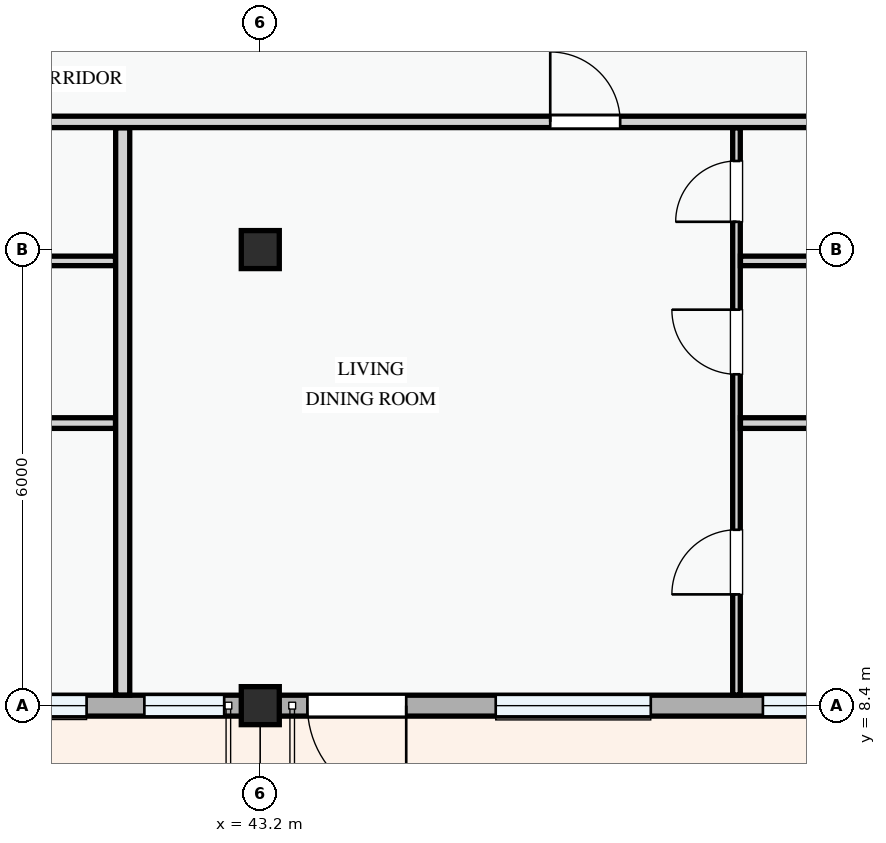
"""IFC4 building model, lengths in metres.
Left out: names, types, materials, properties, quantities, classifications, styles, units other than length and angle.
Written with IfcOpenShell. Run it as: python <this file> out.ifc"""

import sys

from ifc_helpers import new_model, si_unit, direction, frame, frame_2d, origin, origin_2d, place, context, subcontext, project, spatial, rectangle, extrude, element, fill, save


model = new_model("IFC4")
c1 = context("Model", 3, precision=1e-05, world=origin(), true_north=direction((0.0, 1.0)))
c2 = subcontext(c1, "Body", "Model", "MODEL_VIEW")
j1 = project(units=[si_unit("LENGTHUNIT", "METRE"), si_unit("PLANEANGLEUNIT", "RADIAN")], contexts=[c1])
p1 = place(None, origin())
s1 = spatial("IfcSite", under=j1, at=p1, CompositionType="ELEMENT")
p2 = place(p1, origin())
s2 = spatial("IfcBuilding", under=s1, at=p2, CompositionType="ELEMENT")
p3 = place(p2, frame((0.0, 0.0, 24.6)))
s3 = spatial("IfcBuildingStorey", under=s2, at=p3, CompositionType="ELEMENT", Elevation=24.6)
for number, where, z_axis, x_axis in (
    (1, (43.2, 8.4, 0.0), (0.0, 0.0, 1.0), (1.0, 0.0, 0.0)),
    (2, (43.2, 14.4, 0.0), (0.0, 0.0, 1.0), (1.0, 0.0, 0.0)),
):
    element("IfcColumn", number, at=place(p3, frame(where, z_axis=z_axis, x_axis=x_axis)), inside=s3, PredefinedType="COLUMN", context=c2, shape_type="SweptSolid", body=[
        extrude(rectangle(XDim=0.5, YDim=0.5, at=origin_2d()), origin(), (0.0, 0.0, 1.0), 3.3),
    ])
p4 = place(p3, frame((37.2, 8.4, 0.0), z_axis=(0.0, 0.0, 1.0), x_axis=(1.0, 0.0, 0.0)))
e3 = element("IfcWall", 3, at=p4, inside=s3, PredefinedType="STANDARD", context=c2, shape_type="SweptSolid", body=[
    extrude(rectangle(XDim=6.0, YDim=0.275, at=frame_2d((3.0, 0.0))), origin(), (0.0, 0.0, 1.0), 2.475),
])
p5 = place(p4, frame((0.62, 0.0, 0.0)))
e4 = element("IfcOpeningElement", 4, at=p5, cuts=e3, PredefinedType="OPENING", context=c2, shape_type="SweptSolid", body=[
    extrude(rectangle(XDim=1.25, YDim=2.2, at=frame_2d((0.625, 1.1))), frame((0.0, 0.147, 0.0), z_axis=(0.0, -1.0, 0.0), x_axis=(1.0, 0.0, 0.0)), (0.0, 0.0, 1.0), 0.295),
])
p6 = place(p4, frame((2.395, 0.0, 0.78)))
e5 = element("IfcOpeningElement", 5, at=p6, cuts=e3, PredefinedType="OPENING", context=c2, shape_type="SweptSolid", body=[
    extrude(rectangle(XDim=1.32, YDim=1.35, at=frame_2d((0.66, 0.675))), frame((0.0, 0.147, 0.0), z_axis=(0.0, -1.0, 0.0), x_axis=(1.0, 0.0, 0.0)), (0.0, 0.0, 1.0), 0.295),
])
p7 = place(p4, frame((4.475, 0.0, 0.78)))
e6 = element("IfcOpeningElement", 6, at=p7, cuts=e3, PredefinedType="OPENING", context=c2, shape_type="SweptSolid", body=[
    extrude(rectangle(XDim=1.05, YDim=1.2, at=frame_2d((0.525, 0.6))), frame((0.0, 0.147, 0.0), z_axis=(0.0, -1.0, 0.0), x_axis=(1.0, 0.0, 0.0)), (0.0, 0.0, 1.0), 0.295),
])
p8 = place(p3, frame((43.2, 8.4, 0.0), z_axis=(0.0, 0.0, 1.0), x_axis=(1.0, 0.0, 0.0)))
e7 = element("IfcWall", 7, at=p8, inside=s3, PredefinedType="STANDARD", context=c2, shape_type="SweptSolid", body=[
    extrude(rectangle(XDim=8.4, YDim=0.275, at=frame_2d((4.2, 0.0))), origin(), (0.0, 0.0, 1.0), 2.375),
])
p9 = place(p8, frame((0.62, 0.0, 0.0)))
e8 = element("IfcOpeningElement", 8, at=p9, cuts=e7, PredefinedType="OPENING", context=c2, shape_type="SweptSolid", body=[
    extrude(rectangle(XDim=1.3, YDim=2.15, at=frame_2d((0.65, 1.075))), frame((0.0, 0.147, 0.0), z_axis=(0.0, -1.0, 0.0), x_axis=(1.0, 0.0, 0.0)), (0.0, 0.0, 1.0), 0.295),
])
p10 = place(p8, frame((3.097, 0.0, 0.78)))
e9 = element("IfcOpeningElement", 9, at=p10, cuts=e7, PredefinedType="OPENING", context=c2, shape_type="SweptSolid", body=[
    extrude(rectangle(XDim=2.04, YDim=1.46, at=frame_2d((1.02, 0.73))), frame((0.0, 0.147, 0.0), z_axis=(0.0, -1.0, 0.0), x_axis=(1.0, 0.0, 0.0)), (0.0, 0.0, 1.0), 0.295),
])
p11 = place(p8, frame((6.613, 0.0, 0.78)))
e10 = element("IfcOpeningElement", 10, at=p11, cuts=e7, PredefinedType="OPENING", context=c2, shape_type="SweptSolid", body=[
    extrude(rectangle(XDim=1.25, YDim=1.3, at=frame_2d((0.625, 0.65))), frame((0.0, 0.147, 0.0), z_axis=(0.0, -1.0, 0.0), x_axis=(1.0, 0.0, 0.0)), (0.0, 0.0, 1.0), 0.295),
])
p12 = place(p3, frame((35.462, 12.118, 0.0), z_axis=(0.0, 0.0, 1.0), x_axis=(1.0, 0.0, 0.0)))
e11 = element("IfcWall", 11, at=p12, inside=s3, PredefinedType="PARTITIONING", context=c2, shape_type="SweptSolid", body=[
    extrude(rectangle(XDim=5.833, YDim=0.14, at=frame_2d((2.917, 0.0))), origin(), (0.0, 0.0, 1.0), 3.0),
])
p13 = place(p3, frame((35.462, 14.251, 0.0), z_axis=(0.0, 0.0, 1.0), x_axis=(1.0, 0.0, 0.0)))
e12 = element("IfcWall", 12, at=p13, inside=s3, PredefinedType="PARTITIONING", context=c2, shape_type="SweptSolid", body=[
    extrude(rectangle(XDim=5.833, YDim=0.125, at=frame_2d((2.917, 0.0))), origin(), (0.0, 0.0, 1.0), 2.375),
])
p14 = place(p3, frame((49.465, 8.54, 0.0), z_axis=(0.0, 0.0, 1.0), x_axis=(0.0, 1.0, 0.0)))
e13 = element("IfcWall", 13, at=p14, inside=s3, PredefinedType="PARTITIONING", context=c2, shape_type="SweptSolid", body=[
    extrude(rectangle(XDim=7.463, YDim=0.1, at=frame_2d((3.732, 0.0))), origin(), (0.0, 0.0, 1.0), 3.0),
])
p15 = place(p14, frame((1.324, 0.0, 0.0)))
e14 = element("IfcOpeningElement", 14, at=p15, cuts=e13, PredefinedType="OPENING", context=c2, shape_type="SweptSolid", body=[
    extrude(rectangle(XDim=0.85, YDim=2.1, at=frame_2d((0.425, 1.05))), frame((0.0, 0.06, 0.0), z_axis=(0.0, -1.0, 0.0), x_axis=(1.0, 0.0, 0.0)), (0.0, 0.0, 1.0), 0.12),
])
p16 = place(p14, frame((4.22, 0.0, 0.0)))
e15 = element("IfcOpeningElement", 15, at=p16, cuts=e13, PredefinedType="OPENING", context=c2, shape_type="SweptSolid", body=[
    extrude(rectangle(XDim=0.85, YDim=2.1, at=frame_2d((0.425, 1.05))), frame((0.0, 0.06, 0.0), z_axis=(0.0, -1.0, 0.0), x_axis=(1.0, 0.0, 0.0)), (0.0, 0.0, 1.0), 0.12),
])
p17 = place(p14, frame((6.226, 0.0, 0.0)))
e16 = element("IfcOpeningElement", 16, at=p17, cuts=e13, PredefinedType="OPENING", context=c2, shape_type="SweptSolid", body=[
    extrude(rectangle(XDim=0.8, YDim=2.1, at=frame_2d((0.4, 1.05))), frame((0.0, 0.06, 0.0), z_axis=(0.0, -1.0, 0.0), x_axis=(1.0, 0.0, 0.0)), (0.0, 0.0, 1.0), 0.12),
])
p18 = place(p3, frame((49.517, 12.118, 0.0), z_axis=(0.0, 0.0, 1.0), x_axis=(1.0, 0.0, 0.0)))
e17 = element("IfcWall", 17, at=p18, inside=s3, PredefinedType="PARTITIONING", context=c2, shape_type="SweptSolid", body=[
    extrude(rectangle(XDim=7.943, YDim=0.14, at=frame_2d((3.972, 0.0))), origin(), (0.0, 0.0, 1.0), 3.0),
])
p19 = place(p3, frame((49.517, 14.251, 0.0), z_axis=(0.0, 0.0, 1.0), x_axis=(1.0, 0.0, 0.0)))
e18 = element("IfcWall", 18, at=p19, inside=s3, PredefinedType="PARTITIONING", context=c2, shape_type="SweptSolid", body=[
    extrude(rectangle(XDim=7.943, YDim=0.125, at=frame_2d((3.972, 0.0))), origin(), (0.0, 0.0, 1.0), 2.375),
])
p20 = place(p3, frame((41.39, 8.54, 0.0), z_axis=(0.0, 0.0, 1.0), x_axis=(0.0, 1.0, 0.0)))
e19 = element("IfcWall", 19, at=p20, inside=s3, PredefinedType="PARTITIONING", context=c2, shape_type="SweptSolid", body=[
    extrude(rectangle(XDim=7.463, YDim=0.185, at=frame_2d((3.732, 0.0))), origin(), (0.0, 0.0, 1.0), 3.0),
])
p21 = place(p3, frame((22.66, 16.08, 0.0), z_axis=(0.0, 0.0, 1.0), x_axis=(1.0, 0.0, 0.0)))
e20 = element("IfcWall", 20, at=p21, inside=s3, PredefinedType="PARTITIONING", context=c2, shape_type="SweptSolid", body=[
    extrude(rectangle(XDim=34.88, YDim=0.15, at=frame_2d((17.44, 0.0))), origin(), (0.0, 0.0, 1.0), 3.0),
])
p22 = place(p21, frame((2.627, 0.0, 0.0)))
e21 = element("IfcOpeningElement", 21, at=p22, cuts=e20, PredefinedType="OPENING", context=c2, shape_type="SweptSolid", body=[
    extrude(rectangle(XDim=0.92, YDim=2.1, at=frame_2d((0.46, 1.05))), frame((0.0, 0.085, 0.0), z_axis=(0.0, -1.0, 0.0), x_axis=(1.0, 0.0, 0.0)), (0.0, 0.0, 1.0), 0.17),
])
p23 = place(p21, frame((10.02, 0.0, 0.0)))
e22 = element("IfcOpeningElement", 22, at=p23, cuts=e20, PredefinedType="OPENING", context=c2, shape_type="SweptSolid", body=[
    extrude(rectangle(XDim=0.96, YDim=2.12, at=frame_2d((0.48, 1.06))), frame((0.0, 0.085, 0.0), z_axis=(0.0, -1.0, 0.0), x_axis=(1.0, 0.0, 0.0)), (0.0, 0.0, 1.0), 0.17),
])
p24 = place(p21, frame((24.355, 0.0, 0.0)))
e23 = element("IfcOpeningElement", 23, at=p24, cuts=e20, PredefinedType="OPENING", context=c2, shape_type="SweptSolid", body=[
    extrude(rectangle(XDim=0.92, YDim=2.1, at=frame_2d((0.46, 1.05))), frame((0.0, 0.085, 0.0), z_axis=(0.0, -1.0, 0.0), x_axis=(1.0, 0.0, 0.0)), (0.0, 0.0, 1.0), 0.17),
])
p25 = place(p6, origin())
e24 = element("IfcWindow", 24, at=p25, inside=s3, PartitioningType="SINGLE_PANEL", PredefinedType="WINDOW", context=c2, shape_type="SweptSolid", body=[
    extrude(rectangle(XDim=1.32, YDim=1.35, at=frame_2d((0.66, 0.675))), frame((0.0, 0.03, 0.0), z_axis=(0.0, -1.0, 0.0), x_axis=(1.0, 0.0, 0.0)), (0.0, 0.0, 1.0), 0.06),
])
fill(e5, e24)
p26 = place(p7, origin())
e25 = element("IfcWindow", 25, at=p26, inside=s3, PartitioningType="SINGLE_PANEL", PredefinedType="WINDOW", context=c2, shape_type="SweptSolid", body=[
    extrude(rectangle(XDim=1.05, YDim=1.2, at=frame_2d((0.525, 0.6))), frame((0.0, 0.03, 0.0), z_axis=(0.0, -1.0, 0.0), x_axis=(1.0, 0.0, 0.0)), (0.0, 0.0, 1.0), 0.06),
])
fill(e6, e25)
p27 = place(p9, frame((1.3, 0.0, 0.0), z_axis=(0.0, 0.0, 1.0), x_axis=(-1.0, 0.0, 0.0)))
e26 = element("IfcDoor", 26, at=p27, inside=s3, OperationType="SINGLE_SWING_LEFT", PredefinedType="DOOR", context=c2, shape_type="SweptSolid", body=[
    extrude(rectangle(XDim=1.3, YDim=2.15, at=frame_2d((0.65, 1.075))), frame((0.0, 0.025, 0.0), z_axis=(0.0, -1.0, 0.0), x_axis=(1.0, 0.0, 0.0)), (0.0, 0.0, 1.0), 0.05),
])
fill(e8, e26)
p28 = place(p10, origin())
e27 = element("IfcWindow", 27, at=p28, inside=s3, PartitioningType="DOUBLE_PANEL_VERTICAL", PredefinedType="WINDOW", context=c2, shape_type="SweptSolid", body=[
    extrude(rectangle(XDim=2.04, YDim=1.46, at=frame_2d((1.02, 0.73))), frame((0.0, 0.03, 0.0), z_axis=(0.0, -1.0, 0.0), x_axis=(1.0, 0.0, 0.0)), (0.0, 0.0, 1.0), 0.06),
])
fill(e9, e27)
p29 = place(p11, origin())
e28 = element("IfcWindow", 28, at=p29, inside=s3, PartitioningType="SINGLE_PANEL", PredefinedType="WINDOW", context=c2, shape_type="SweptSolid", body=[
    extrude(rectangle(XDim=1.25, YDim=1.3, at=frame_2d((0.625, 0.65))), frame((0.0, 0.03, 0.0), z_axis=(0.0, -1.0, 0.0), x_axis=(1.0, 0.0, 0.0)), (0.0, 0.0, 1.0), 0.06),
])
fill(e10, e28)
p30 = place(p15, origin())
e29 = element("IfcDoor", 29, at=p30, inside=s3, OperationType="SINGLE_SWING_LEFT", PredefinedType="DOOR", context=c2, shape_type="SweptSolid", body=[
    extrude(rectangle(XDim=0.85, YDim=2.1, at=frame_2d((0.425, 1.05))), frame((0.0, 0.025, 0.0), z_axis=(0.0, -1.0, 0.0), x_axis=(1.0, 0.0, 0.0)), (0.0, 0.0, 1.0), 0.05),
])
fill(e14, e29)
p31 = place(p16, origin())
e30 = element("IfcDoor", 30, at=p31, inside=s3, OperationType="SINGLE_SWING_RIGHT", PredefinedType="DOOR", context=c2, shape_type="SweptSolid", body=[
    extrude(rectangle(XDim=0.85, YDim=2.1, at=frame_2d((0.425, 1.05))), frame((0.0, 0.025, 0.0), z_axis=(0.0, -1.0, 0.0), x_axis=(1.0, 0.0, 0.0)), (0.0, 0.0, 1.0), 0.05),
])
fill(e15, e30)
p32 = place(p17, origin())
e31 = element("IfcDoor", 31, at=p32, inside=s3, OperationType="SINGLE_SWING_LEFT", PredefinedType="DOOR", context=c2, shape_type="SweptSolid", body=[
    extrude(rectangle(XDim=0.8, YDim=2.1, at=frame_2d((0.4, 1.05))), frame((0.0, 0.025, 0.0), z_axis=(0.0, -1.0, 0.0), x_axis=(1.0, 0.0, 0.0)), (0.0, 0.0, 1.0), 0.05),
])
fill(e16, e31)
p33 = place(p24, origin())
e32 = element("IfcDoor", 32, at=p33, inside=s3, OperationType="SINGLE_SWING_LEFT", PredefinedType="DOOR", context=c2, shape_type="SweptSolid", body=[
    extrude(rectangle(XDim=0.92, YDim=2.1, at=frame_2d((0.46, 1.05))), frame((0.0, 0.025, 0.0), z_axis=(0.0, -1.0, 0.0), x_axis=(1.0, 0.0, 0.0)), (0.0, 0.0, 1.0), 0.05),
])
fill(e23, e32)
save(model, sys.argv[1])
